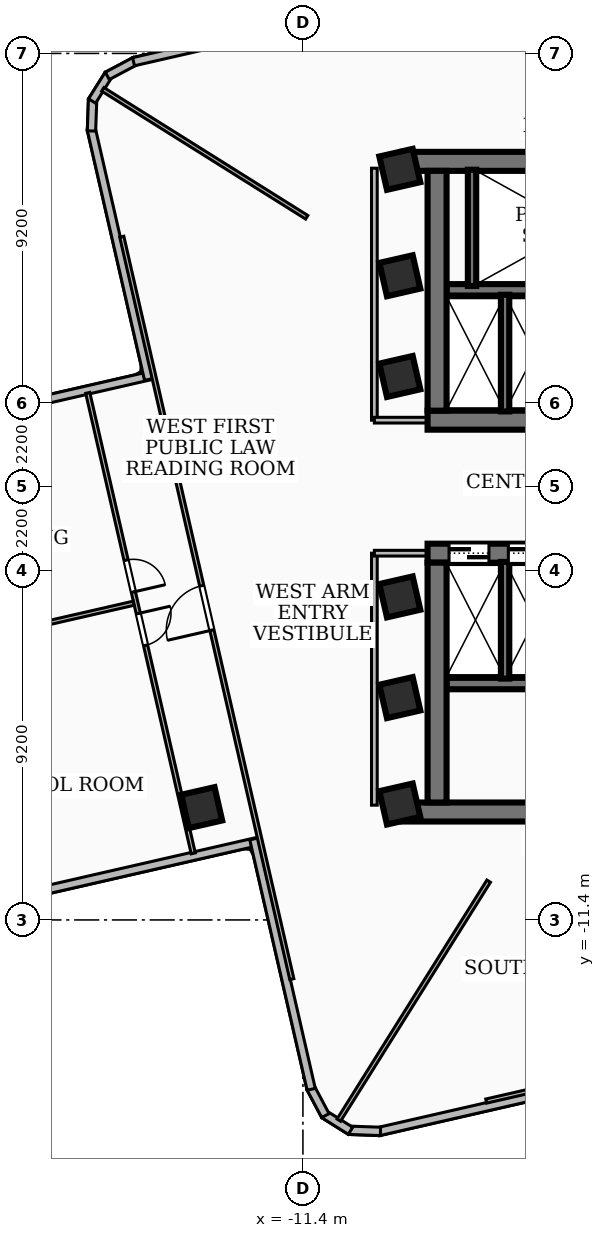
"""IFC4 building model, lengths in metres.
Left out: names, types, materials, properties, quantities, classifications, styles, units other than length and angle.
Written with IfcOpenShell. Run it as: python <this file> out.ifc"""

import sys

from ifc_helpers import new_model, si_unit, direction, frame, frame_2d, origin, origin_2d, place, context, subcontext, project, spatial, rectangle, extrude, element, fill, save


model = new_model("IFC4")
c1 = context("Model", 3, precision=1e-05, world=origin(), true_north=direction((0.0, 1.0)))
c2 = subcontext(c1, "Body", "Model", "MODEL_VIEW")
j1 = project(units=[si_unit("LENGTHUNIT", "METRE"), si_unit("PLANEANGLEUNIT", "RADIAN")], contexts=[c1])
p1 = place(None, origin())
s1 = spatial("IfcSite", under=j1, at=p1, CompositionType="ELEMENT")
p2 = place(p1, origin())
s2 = spatial("IfcBuilding", under=s1, at=p2, CompositionType="ELEMENT")
p3 = place(p2, frame((0.0, 0.0, 116.28)))
s3 = spatial("IfcBuildingStorey", under=s2, at=p3, CompositionType="ELEMENT", Elevation=116.28)
p4 = place(p3, frame((-8.78, 8.56, 0.0), z_axis=(0.0, 0.0, 1.0), x_axis=(1.0, 0.0, 0.0)))
e1 = element("IfcWall", 1, at=p4, inside=s3, PredefinedType="SHEAR", context=c2, shape_type="SweptSolid", body=[
    extrude(rectangle(XDim=17.56, YDim=0.5, at=frame_2d((8.78, 0.0))), origin(), (0.0, 0.0, 1.0), 3.34),
])
p5 = place(p3, frame((8.12, 1.75, 0.0), z_axis=(0.0, 0.0, 1.0), x_axis=(-1.0, 0.0, 0.0)))
e2 = element("IfcWall", 2, at=p5, inside=s3, PredefinedType="SHEAR", context=c2, shape_type="SweptSolid", body=[
    extrude(rectangle(XDim=16.24, YDim=0.5, at=frame_2d((8.12, 0.0))), origin(), (0.0, 0.0, 1.0), 3.34),
])
p6 = place(p5, frame((7.45, 0.0, 0.0)))
e3 = element("IfcOpeningElement", 3, at=p6, cuts=e2, PredefinedType="OPENING", context=c2, shape_type="SweptSolid", body=[
    extrude(rectangle(XDim=1.0, YDim=2.1, at=frame_2d((0.5, 1.05))), frame((0.0, 0.26, 0.0), z_axis=(0.0, -1.0, 0.0), x_axis=(1.0, 0.0, 0.0)), (0.0, 0.0, 1.0), 0.52),
])
p7 = place(p5, frame((3.4, 0.0, 0.0)))
e4 = element("IfcOpeningElement", 4, at=p7, cuts=e2, PredefinedType="OPENING", context=c2, shape_type="SweptSolid", body=[
    extrude(rectangle(XDim=0.9, YDim=2.06, at=frame_2d((0.45, 1.03))), frame((0.0, 0.26, 0.0), z_axis=(0.0, -1.0, 0.0), x_axis=(1.0, 0.0, 0.0)), (0.0, 0.0, 1.0), 0.52),
])
p8 = place(p5, frame((1.1, 0.0, 0.0)))
e5 = element("IfcOpeningElement", 5, at=p8, cuts=e2, PredefinedType="OPENING", context=c2, shape_type="SweptSolid", body=[
    extrude(rectangle(XDim=0.9, YDim=2.06, at=frame_2d((0.45, 1.03))), frame((0.0, 0.26, 0.0), z_axis=(0.0, -1.0, 0.0), x_axis=(1.0, 0.0, 0.0)), (0.0, 0.0, 1.0), 0.52),
])
p9 = place(p3, frame((-7.87, 2.0, 0.0), z_axis=(0.0, 0.0, 1.0), x_axis=(0.0, 1.0, 0.0)))
e6 = element("IfcWall", 6, at=p9, inside=s3, PredefinedType="SHEAR", context=c2, shape_type="SweptSolid", body=[
    extrude(rectangle(XDim=6.31, YDim=0.5, at=frame_2d((3.155, 0.0))), origin(), (0.0, 0.0, 1.0), 3.34),
])
p10 = place(p3, frame((7.62, 5.18, 0.0), z_axis=(0.0, 0.0, 1.0), x_axis=(-1.0, 0.0, 0.0)))
e7 = element("IfcWall", 7, at=p10, inside=s3, PredefinedType="SOLIDWALL", context=c2, shape_type="SweptSolid", body=[
    extrude(rectangle(XDim=15.24, YDim=0.3, at=frame_2d((7.62, 0.0))), origin(), (0.0, 0.0, 1.0), 3.34),
])
p11 = place(p10, frame((5.77, 0.0, 0.0)))
e8 = element("IfcOpeningElement", 8, at=p11, cuts=e7, PredefinedType="OPENING", context=c2, shape_type="SweptSolid", body=[
    extrude(rectangle(XDim=1.1, YDim=2.15, at=frame_2d((0.55, 1.075))), frame((0.0, 0.16, 0.0), z_axis=(0.0, -1.0, 0.0), x_axis=(1.0, 0.0, 0.0)), (0.0, 0.0, 1.0), 0.32),
])
p12 = place(p10, frame((2.97, 0.0, 0.0)))
e9 = element("IfcOpeningElement", 9, at=p12, cuts=e7, PredefinedType="OPENING", context=c2, shape_type="SweptSolid", body=[
    extrude(rectangle(XDim=1.1, YDim=2.15, at=frame_2d((0.55, 1.075))), frame((0.0, 0.16, 0.0), z_axis=(0.0, -1.0, 0.0), x_axis=(1.0, 0.0, 0.0)), (0.0, 0.0, 1.0), 0.32),
])
p13 = place(p10, frame((7.97, 0.0, 0.0)))
e10 = element("IfcOpeningElement", 10, at=p13, cuts=e7, PredefinedType="OPENING", context=c2, shape_type="SweptSolid", body=[
    extrude(rectangle(XDim=1.0, YDim=2.1, at=frame_2d((0.5, 1.05))), frame((0.0, 0.16, 0.0), z_axis=(0.0, -1.0, 0.0), x_axis=(1.0, 0.0, 0.0)), (0.0, 0.0, 1.0), 0.32),
])
p14 = place(p3, frame((8.78, -8.56, 0.0), z_axis=(0.0, 0.0, 1.0), x_axis=(-1.0, 0.0, 0.0)))
e11 = element("IfcWall", 11, at=p14, inside=s3, PredefinedType="SHEAR", context=c2, shape_type="SweptSolid", body=[
    extrude(rectangle(XDim=17.56, YDim=0.5, at=frame_2d((8.78, 0.0))), origin(), (0.0, 0.0, 1.0), 3.34),
])
p15 = place(p3, frame((-8.12, -1.75, 0.0), z_axis=(0.0, 0.0, 1.0), x_axis=(1.0, 0.0, 0.0)))
e12 = element("IfcWall", 12, at=p15, inside=s3, PredefinedType="SHEAR", context=c2, shape_type="SweptSolid", body=[
    extrude(rectangle(XDim=16.24, YDim=0.5, at=frame_2d((8.12, 0.0))), origin(), (0.0, 0.0, 1.0), 3.34),
])
p16 = place(p15, frame((7.45, 0.0, 0.0)))
e13 = element("IfcOpeningElement", 13, at=p16, cuts=e12, PredefinedType="OPENING", context=c2, shape_type="SweptSolid", body=[
    extrude(rectangle(XDim=1.0, YDim=2.1, at=frame_2d((0.5, 1.05))), frame((0.0, 0.26, 0.0), z_axis=(0.0, -1.0, 0.0), x_axis=(1.0, 0.0, 0.0)), (0.0, 0.0, 1.0), 0.52),
])
p17 = place(p15, frame((12.65, 0.0, 0.0)))
e14 = element("IfcOpeningElement", 14, at=p17, cuts=e12, PredefinedType="OPENING", context=c2, shape_type="SweptSolid", body=[
    extrude(rectangle(XDim=0.9, YDim=2.06, at=frame_2d((0.45, 1.03))), frame((0.0, 0.26, 0.0), z_axis=(0.0, -1.0, 0.0), x_axis=(1.0, 0.0, 0.0)), (0.0, 0.0, 1.0), 0.52),
])
p18 = place(p15, frame((0.565, 0.0, 0.0)))
e15 = element("IfcOpeningElement", 15, at=p18, cuts=e12, PredefinedType="OPENING", context=c2, shape_type="SweptSolid", body=[
    extrude(rectangle(XDim=1.05, YDim=2.15, at=frame_2d((0.525, 1.075))), frame((0.0, 0.26, 0.0), z_axis=(0.0, -1.0, 0.0), x_axis=(1.0, 0.0, 0.0)), (0.0, 0.0, 1.0), 0.52),
])
p19 = place(p15, frame((2.125, 0.0, 0.0)))
e16 = element("IfcOpeningElement", 16, at=p19, cuts=e12, PredefinedType="OPENING", context=c2, shape_type="SweptSolid", body=[
    extrude(rectangle(XDim=1.05, YDim=2.15, at=frame_2d((0.525, 1.075))), frame((0.0, 0.26, 0.0), z_axis=(0.0, -1.0, 0.0), x_axis=(1.0, 0.0, 0.0)), (0.0, 0.0, 1.0), 0.52),
])
p20 = place(p15, frame((3.685, 0.0, 0.0)))
e17 = element("IfcOpeningElement", 17, at=p20, cuts=e12, PredefinedType="OPENING", context=c2, shape_type="SweptSolid", body=[
    extrude(rectangle(XDim=1.05, YDim=2.15, at=frame_2d((0.525, 1.075))), frame((0.0, 0.26, 0.0), z_axis=(0.0, -1.0, 0.0), x_axis=(1.0, 0.0, 0.0)), (0.0, 0.0, 1.0), 0.52),
])
p21 = place(p3, frame((-7.87, -8.31, 0.0), z_axis=(0.0, 0.0, 1.0), x_axis=(0.0, 1.0, 0.0)))
e18 = element("IfcWall", 18, at=p21, inside=s3, PredefinedType="SHEAR", context=c2, shape_type="SweptSolid", body=[
    extrude(rectangle(XDim=6.31, YDim=0.5, at=frame_2d((3.155, 0.0))), origin(), (0.0, 0.0, 1.0), 3.34),
])
p22 = place(p3, frame((-7.62, -5.18, 0.0), z_axis=(0.0, 0.0, 1.0), x_axis=(1.0, 0.0, 0.0)))
e19 = element("IfcWall", 19, at=p22, inside=s3, PredefinedType="SOLIDWALL", context=c2, shape_type="SweptSolid", body=[
    extrude(rectangle(XDim=15.24, YDim=0.3, at=frame_2d((7.62, 0.0))), origin(), (0.0, 0.0, 1.0), 3.34),
])
p23 = place(p22, frame((5.77, 0.0, 0.0)))
e20 = element("IfcOpeningElement", 20, at=p23, cuts=e19, PredefinedType="OPENING", context=c2, shape_type="SweptSolid", body=[
    extrude(rectangle(XDim=1.1, YDim=2.15, at=frame_2d((0.55, 1.075))), frame((0.0, 0.16, 0.0), z_axis=(0.0, -1.0, 0.0), x_axis=(1.0, 0.0, 0.0)), (0.0, 0.0, 1.0), 0.32),
])
p24 = place(p22, frame((7.97, 0.0, 0.0)))
e21 = element("IfcOpeningElement", 21, at=p24, cuts=e19, PredefinedType="OPENING", context=c2, shape_type="SweptSolid", body=[
    extrude(rectangle(XDim=1.0, YDim=2.1, at=frame_2d((0.5, 1.05))), frame((0.0, 0.16, 0.0), z_axis=(0.0, -1.0, 0.0), x_axis=(1.0, 0.0, 0.0)), (0.0, 0.0, 1.0), 0.32),
])
p25 = place(p3, frame((-6.95, 5.28, 0.0), z_axis=(0.0, 0.0, 1.0), x_axis=(0.0, 1.0, 0.0)))
e22 = element("IfcWall", 22, at=p25, inside=s3, PredefinedType="SOLIDWALL", context=c2, shape_type="SweptSolid", body=[
    extrude(rectangle(XDim=3.06, YDim=0.22, at=frame_2d((1.53, 0.0))), origin(), (0.0, 0.0, 1.0), 3.34),
])
for number, where, z_axis, x_axis in (
    (23, (-6.08, 1.98, 0.0), (0.0, 0.0, 1.0), (0.0, 1.0, 0.0)),
    (24, (-6.08, -5.05, 0.0), (0.0, 0.0, 1.0), (0.0, 1.0, 0.0)),
):
    element("IfcWall", number, at=place(p3, frame(where, z_axis=z_axis, x_axis=x_axis)), inside=s3, PredefinedType="SOLIDWALL", context=c2, shape_type="SweptSolid", body=[
        extrude(rectangle(XDim=3.07, YDim=0.22, at=frame_2d((1.535, 0.0))), origin(), (0.0, 0.0, 1.0), 3.34),
    ])
for number, where, z_axis, x_axis in (
    (25, (-8.85, -5.55, 0.0), (0.0, 0.0, 1.0), (0.975, 0.223, 0.0)),
    (26, (-8.85, -2.9, 0.0), (0.0, 0.0, 1.0), (0.975, 0.223, 0.0)),
    (27, (-8.85, 2.9, 0.0), (0.0, 0.0, 1.0), (0.975, 0.223, 0.0)),
    (28, (-8.85, 5.55, 0.0), (0.0, 0.0, 1.0), (0.975, 0.223, 0.0)),
    (29, (-8.85, 8.35, 0.0), (0.0, 0.0, 1.0), (0.975, 0.223, 0.0)),
    (30, (-8.85, -8.35, 0.0), (0.0, 0.0, 1.0), (0.975, 0.223, 0.0)),
    (31, (-14.064, -8.445, 0.0), (0.0, 0.0, 1.0), (0.975, 0.223, 0.0)),
):
    element("IfcColumn", number, at=place(p3, frame(where, z_axis=z_axis, x_axis=x_axis)), inside=s3, PredefinedType="COLUMN", context=c2, shape_type="SweptSolid", body=[
        extrude(rectangle(XDim=0.9, YDim=0.9, at=origin_2d()), origin(), (0.0, 0.0, 1.0), 3.6),
    ])
p26 = place(p3, frame((-12.585, -9.335, 0.0), z_axis=(0.0, 0.0, 1.0), x_axis=(-0.974754036658, -0.223281365141, 0.0)))
e32 = element("IfcWall", 32, at=p26, inside=s3, PredefinedType="SOLIDWALL", context=c2, shape_type="SweptSolid", body=[
    extrude(rectangle(XDim=13.459, YDim=0.22, at=frame_2d((6.729, 0.0))), origin(), (0.0, 0.0, 1.0), 3.34),
])
p27 = place(p26, frame((10.559, 0.0, 0.85)))
e33 = element("IfcOpeningElement", 33, at=p27, cuts=e32, PredefinedType="OPENING", context=c2, shape_type="SweptSolid", body=[
    extrude(rectangle(XDim=1.8, YDim=2.0, at=frame_2d((0.9, 1.0))), frame((0.0, 0.12, 0.0), z_axis=(0.0, -1.0, 0.0), x_axis=(1.0, 0.0, 0.0)), (0.0, 0.0, 1.0), 0.24),
])
p28 = place(p3, frame((-28.512, -0.078, 0.0), z_axis=(0.0, 0.0, 1.0), x_axis=(0.974753462872, 0.223283870038, 0.0)))
e34 = element("IfcWall", 34, at=p28, inside=s3, PredefinedType="SOLIDWALL", context=c2, shape_type="SweptSolid", body=[
    extrude(rectangle(XDim=13.458, YDim=0.22, at=frame_2d((6.729, 0.0))), origin(), (0.0, 0.0, 1.0), 3.34),
])
p29 = place(p28, frame((1.1, 0.0, 0.85)))
e35 = element("IfcOpeningElement", 35, at=p29, cuts=e34, PredefinedType="OPENING", context=c2, shape_type="SweptSolid", body=[
    extrude(rectangle(XDim=1.8, YDim=1.6, at=frame_2d((0.9, 0.8))), frame((0.0, 0.12, 0.0), z_axis=(0.0, -1.0, 0.0), x_axis=(1.0, 0.0, 0.0)), (0.0, 0.0, 1.0), 0.24),
])
p30 = place(p3, frame((-15.46, 2.821, 0.0), z_axis=(0.0, 0.0, 1.0), x_axis=(-0.223278912438, 0.974754598481, 0.0)))
e36 = element("IfcWall", 36, at=p30, inside=s3, PredefinedType="SOLIDWALL", context=c2, shape_type="SweptSolid", body=[
    extrude(rectangle(XDim=6.759, YDim=0.22, at=frame_2d((3.379, 0.0))), origin(), (0.0, 0.0, 1.0), 3.34),
])
p31 = place(p3, frame((-16.964, 9.36, 0.0), z_axis=(0.0, 0.0, 1.0), x_axis=(0.035983706773, 0.999352376715, 0.0)))
e37 = element("IfcWall", 37, at=p31, inside=s3, PredefinedType="SOLIDWALL", context=c2, shape_type="SweptSolid", body=[
    extrude(rectangle(XDim=0.834, YDim=0.22, at=frame_2d((0.417, 0.0))), origin(), (0.0, 0.0, 1.0), 3.34),
])
p32 = place(p3, frame((-16.948, 10.148, 0.0), z_axis=(0.0, 0.0, 1.0), x_axis=(0.531096868492, 0.847311109497, 0.0)))
e38 = element("IfcWall", 38, at=p32, inside=s3, PredefinedType="SOLIDWALL", context=c2, shape_type="SweptSolid", body=[
    extrude(rectangle(XDim=0.819, YDim=0.22, at=frame_2d((0.41, 0.0))), origin(), (0.0, 0.0, 1.0), 3.34),
])
p33 = place(p3, frame((-16.548, 10.809, 0.0), z_axis=(0.0, 0.0, 1.0), x_axis=(0.883460266876, 0.468506090516, 0.0)))
e39 = element("IfcWall", 39, at=p33, inside=s3, PredefinedType="SOLIDWALL", context=c2, shape_type="SweptSolid", body=[
    extrude(rectangle(XDim=0.834, YDim=0.22, at=frame_2d((0.417, 0.0))), origin(), (0.0, 0.0, 1.0), 3.34),
])
p34 = place(p3, frame((-15.857, 11.182, 0.0), z_axis=(0.0, 0.0, 1.0), x_axis=(0.974754598481, 0.223278912438, 0.0)))
e40 = element("IfcWall", 40, at=p34, inside=s3, PredefinedType="SOLIDWALL", context=c2, shape_type="SweptSolid", body=[
    extrude(rectangle(XDim=6.759, YDim=0.22, at=frame_2d((3.379, 0.0))), origin(), (0.0, 0.0, 1.0), 3.34),
])
p35 = place(p3, frame((-2.821, -15.46, 0.0), z_axis=(0.0, 0.0, 1.0), x_axis=(-0.974754598481, -0.223278912438, 0.0)))
e41 = element("IfcWall", 41, at=p35, inside=s3, PredefinedType="SOLIDWALL", context=c2, shape_type="SweptSolid", body=[
    extrude(rectangle(XDim=6.759, YDim=0.22, at=frame_2d((3.379, 0.0))), origin(), (0.0, 0.0, 1.0), 2.57),
])
p36 = place(p3, frame((-9.36, -16.964, 0.0), z_axis=(0.0, 0.0, 1.0), x_axis=(-0.999352376715, 0.035983706773, 0.0)))
e42 = element("IfcWall", 42, at=p36, inside=s3, PredefinedType="SOLIDWALL", context=c2, shape_type="SweptSolid", body=[
    extrude(rectangle(XDim=0.834, YDim=0.22, at=frame_2d((0.417, 0.0))), origin(), (0.0, 0.0, 1.0), 3.34),
])
p37 = place(p3, frame((-10.148, -16.948, 0.0), z_axis=(0.0, 0.0, 1.0), x_axis=(-0.847311109497, 0.531096868492, 0.0)))
e43 = element("IfcWall", 43, at=p37, inside=s3, PredefinedType="SOLIDWALL", context=c2, shape_type="SweptSolid", body=[
    extrude(rectangle(XDim=0.819, YDim=0.22, at=frame_2d((0.41, 0.0))), origin(), (0.0, 0.0, 1.0), 3.34),
])
p38 = place(p3, frame((-10.809, -16.548, 0.0), z_axis=(0.0, 0.0, 1.0), x_axis=(-0.468506090516, 0.883460266876, 0.0)))
e44 = element("IfcWall", 44, at=p38, inside=s3, PredefinedType="SOLIDWALL", context=c2, shape_type="SweptSolid", body=[
    extrude(rectangle(XDim=0.834, YDim=0.22, at=frame_2d((0.417, 0.0))), origin(), (0.0, 0.0, 1.0), 3.34),
])
p39 = place(p3, frame((-11.182, -15.857, 0.0), z_axis=(0.0, 0.0, 1.0), x_axis=(-0.223278912438, 0.974754598481, 0.0)))
e45 = element("IfcWall", 45, at=p39, inside=s3, PredefinedType="SOLIDWALL", context=c2, shape_type="SweptSolid", body=[
    extrude(rectangle(XDim=6.759, YDim=0.22, at=frame_2d((3.379, 0.0))), origin(), (0.0, 0.0, 1.0), 3.34),
])
p40 = place(p3, frame((-9.52, 1.75, 0.0), z_axis=(0.0, 0.0, 1.0), x_axis=(0.0, 1.0, 0.0)))
e46 = element("IfcWall", 46, at=p40, inside=s3, PredefinedType="PARTITIONING", context=c2, shape_type="SweptSolid", body=[
    extrude(rectangle(XDim=6.63, YDim=0.15, at=frame_2d((3.315, 0.0))), origin(), (0.0, 0.0, 1.0), 2.57),
])
p41 = place(p3, frame((-7.85, 1.75, 0.0), z_axis=(0.0, 0.0, 1.0), x_axis=(-1.0, 0.0, 0.0)))
e47 = element("IfcWall", 47, at=p41, inside=s3, PredefinedType="PARTITIONING", context=c2, shape_type="SweptSolid", body=[
    extrude(rectangle(XDim=1.67, YDim=0.15, at=frame_2d((0.835, 0.0))), origin(), (0.0, 0.0, 1.0), 2.57),
])
p42 = place(p3, frame((-9.52, -8.38, 0.0), z_axis=(0.0, 0.0, 1.0), x_axis=(0.0, 1.0, 0.0)))
e48 = element("IfcWall", 48, at=p42, inside=s3, PredefinedType="PARTITIONING", context=c2, shape_type="SweptSolid", body=[
    extrude(rectangle(XDim=6.63, YDim=0.15, at=frame_2d((3.315, 0.0))), origin(), (0.0, 0.0, 1.0), 2.57),
])
p43 = place(p3, frame((-7.85, -1.75, 0.0), z_axis=(0.0, 0.0, 1.0), x_axis=(-1.0, 0.0, 0.0)))
e49 = element("IfcWall", 49, at=p43, inside=s3, PredefinedType="PARTITIONING", context=c2, shape_type="SweptSolid", body=[
    extrude(rectangle(XDim=1.67, YDim=0.15, at=frame_2d((0.835, 0.0))), origin(), (0.0, 0.0, 1.0), 2.57),
])
p44 = place(p3, frame((-11.3, 7.089, 0.0), z_axis=(0.0, 0.0, 1.0), x_axis=(-0.847172398776, 0.531318103167, 0.0)))
e50 = element("IfcWall", 50, at=p44, inside=s3, PredefinedType="PARTITIONING", context=c2, shape_type="SweptSolid", body=[
    extrude(rectangle(XDim=6.335, YDim=0.11, at=frame_2d((3.167, 0.0))), origin(), (0.0, 0.0, 1.0), 3.34),
])
p45 = place(p3, frame((-6.512, -10.38, 0.0), z_axis=(0.0, 0.0, 1.0), x_axis=(-0.531323053356, -0.847169294163, 0.0)))
e51 = element("IfcWall", 51, at=p45, inside=s3, PredefinedType="PARTITIONING", context=c2, shape_type="SweptSolid", body=[
    extrude(rectangle(XDim=7.421, YDim=0.11, at=frame_2d((3.711, 0.0))), origin(), (0.0, 0.0, 1.0), 2.57),
])
p46 = place(p3, frame((-11.692, -12.957, 0.0), z_axis=(0.0, 0.0, 1.0), x_axis=(-0.223262093598, 0.97475845088, 0.0)))
e52 = element("IfcWall", 52, at=p46, inside=s3, PredefinedType="PARTITIONING", context=c2, shape_type="SweptSolid", body=[
    extrude(rectangle(XDim=20.04, YDim=0.11, at=frame_2d((10.02, 0.0))), origin(), (0.0, 0.0, 1.0), 2.57),
])
p47 = place(p46, frame((9.42, 0.0, 0.0)))
e53 = element("IfcOpeningElement", 53, at=p47, cuts=e52, PredefinedType="OPENING", context=c2, shape_type="SweptSolid", body=[
    extrude(rectangle(XDim=1.2, YDim=2.1, at=frame_2d((0.6, 1.05))), frame((0.0, 0.065, 0.0), z_axis=(0.0, -1.0, 0.0), x_axis=(1.0, 0.0, 0.0)), (0.0, 0.0, 1.0), 0.13),
])
p48 = place(p3, frame((-15.855, -3.067, 0.0), z_axis=(0.0, 0.0, 1.0), x_axis=(-0.974758398925, -0.223262320434, 0.0)))
e54 = element("IfcWall", 54, at=p48, inside=s3, PredefinedType="PARTITIONING", context=c2, shape_type="SweptSolid", body=[
    extrude(rectangle(XDim=13.075, YDim=0.11, at=frame_2d((6.538, 0.0))), origin(), (0.0, 0.0, 1.0), 2.72),
])
p49 = place(p3, frame((-17.062, 2.468, 0.0), z_axis=(0.0, 0.0, 1.0), x_axis=(0.223341555051, -0.974740247341, 0.0)))
e55 = element("IfcWall", 55, at=p49, inside=s3, PredefinedType="PARTITIONING", context=c2, shape_type="SweptSolid", body=[
    extrude(rectangle(XDim=12.43, YDim=0.11, at=frame_2d((6.215, 0.0))), origin(), (0.0, 0.0, 1.0), 2.57),
])
p50 = place(p49, frame((4.515, 0.0, 0.0)))
e56 = element("IfcOpeningElement", 56, at=p50, cuts=e55, PredefinedType="OPENING", context=c2, shape_type="SweptSolid", body=[
    extrude(rectangle(XDim=0.86, YDim=2.04, at=frame_2d((0.43, 1.02))), frame((0.0, 0.065, 0.0), z_axis=(0.0, -1.0, 0.0), x_axis=(1.0, 0.0, 0.0)), (0.0, 0.0, 1.0), 0.13),
])
p51 = place(p49, frame((5.955, 0.0, 0.0)))
e57 = element("IfcOpeningElement", 57, at=p51, cuts=e55, PredefinedType="OPENING", context=c2, shape_type="SweptSolid", body=[
    extrude(rectangle(XDim=0.86, YDim=2.04, at=frame_2d((0.43, 1.02))), frame((0.0, 0.065, 0.0), z_axis=(0.0, -1.0, 0.0), x_axis=(1.0, 0.0, 0.0)), (0.0, 0.0, 1.0), 0.13),
])
p52 = place(p3, frame((12.957, -11.692, 0.0), z_axis=(0.0, 0.0, 1.0), x_axis=(-0.97475845088, -0.223262093598, 0.0)))
e58 = element("IfcWall", 58, at=p52, inside=s3, PredefinedType="PARTITIONING", context=c2, shape_type="SweptSolid", body=[
    extrude(rectangle(XDim=20.04, YDim=0.11, at=frame_2d((10.02, 0.0))), origin(), (0.0, 0.0, 1.0), 2.57),
])
p53 = place(p52, frame((9.42, 0.0, 0.0)))
e59 = element("IfcOpeningElement", 59, at=p53, cuts=e58, PredefinedType="OPENING", context=c2, shape_type="SweptSolid", body=[
    extrude(rectangle(XDim=1.2, YDim=2.1, at=frame_2d((0.6, 1.05))), frame((0.0, 0.065, 0.0), z_axis=(0.0, -1.0, 0.0), x_axis=(1.0, 0.0, 0.0)), (0.0, 0.0, 1.0), 0.13),
])
p54 = place(p18, origin())
e60 = element("IfcDoor", 60, at=p54, inside=s3, OperationType="DOUBLE_DOOR_SLIDING", PredefinedType="DOOR", context=c2, shape_type="SweptSolid", body=[
    extrude(rectangle(XDim=1.05, YDim=2.15, at=frame_2d((0.525, 1.075))), frame((0.0, 0.025, 0.0), z_axis=(0.0, -1.0, 0.0), x_axis=(1.0, 0.0, 0.0)), (0.0, 0.0, 1.0), 0.05),
])
fill(e15, e60)
p55 = place(p19, origin())
e61 = element("IfcDoor", 61, at=p55, inside=s3, OperationType="DOUBLE_DOOR_SLIDING", PredefinedType="DOOR", context=c2, shape_type="SweptSolid", body=[
    extrude(rectangle(XDim=1.05, YDim=2.15, at=frame_2d((0.525, 1.075))), frame((0.0, 0.025, 0.0), z_axis=(0.0, -1.0, 0.0), x_axis=(1.0, 0.0, 0.0)), (0.0, 0.0, 1.0), 0.05),
])
fill(e16, e61)
p56 = place(p47, origin())
e62 = element("IfcDoor", 62, at=p56, inside=s3, OperationType="SINGLE_SWING_LEFT", PredefinedType="DOOR", context=c2, shape_type="SweptSolid", body=[
    extrude(rectangle(XDim=1.2, YDim=2.1, at=frame_2d((0.6, 1.05))), frame((0.0, 0.025, 0.0), z_axis=(0.0, -1.0, 0.0), x_axis=(1.0, 0.0, 0.0)), (0.0, 0.0, 1.0), 0.05),
])
fill(e53, e62)
p57 = place(p50, origin())
e63 = element("IfcDoor", 63, at=p57, inside=s3, OperationType="SINGLE_SWING_RIGHT", PredefinedType="DOOR", context=c2, shape_type="SweptSolid", body=[
    extrude(rectangle(XDim=0.86, YDim=2.04, at=frame_2d((0.43, 1.02))), frame((0.0, 0.025, 0.0), z_axis=(0.0, -1.0, 0.0), x_axis=(1.0, 0.0, 0.0)), (0.0, 0.0, 1.0), 0.05),
])
fill(e56, e63)
p58 = place(p51, origin())
e64 = element("IfcDoor", 64, at=p58, inside=s3, OperationType="SINGLE_SWING_LEFT", PredefinedType="DOOR", context=c2, shape_type="SweptSolid", body=[
    extrude(rectangle(XDim=0.86, YDim=2.04, at=frame_2d((0.43, 1.02))), frame((0.0, 0.025, 0.0), z_axis=(0.0, -1.0, 0.0), x_axis=(1.0, 0.0, 0.0)), (0.0, 0.0, 1.0), 0.05),
])
fill(e57, e64)
save(model, sys.argv[1])
